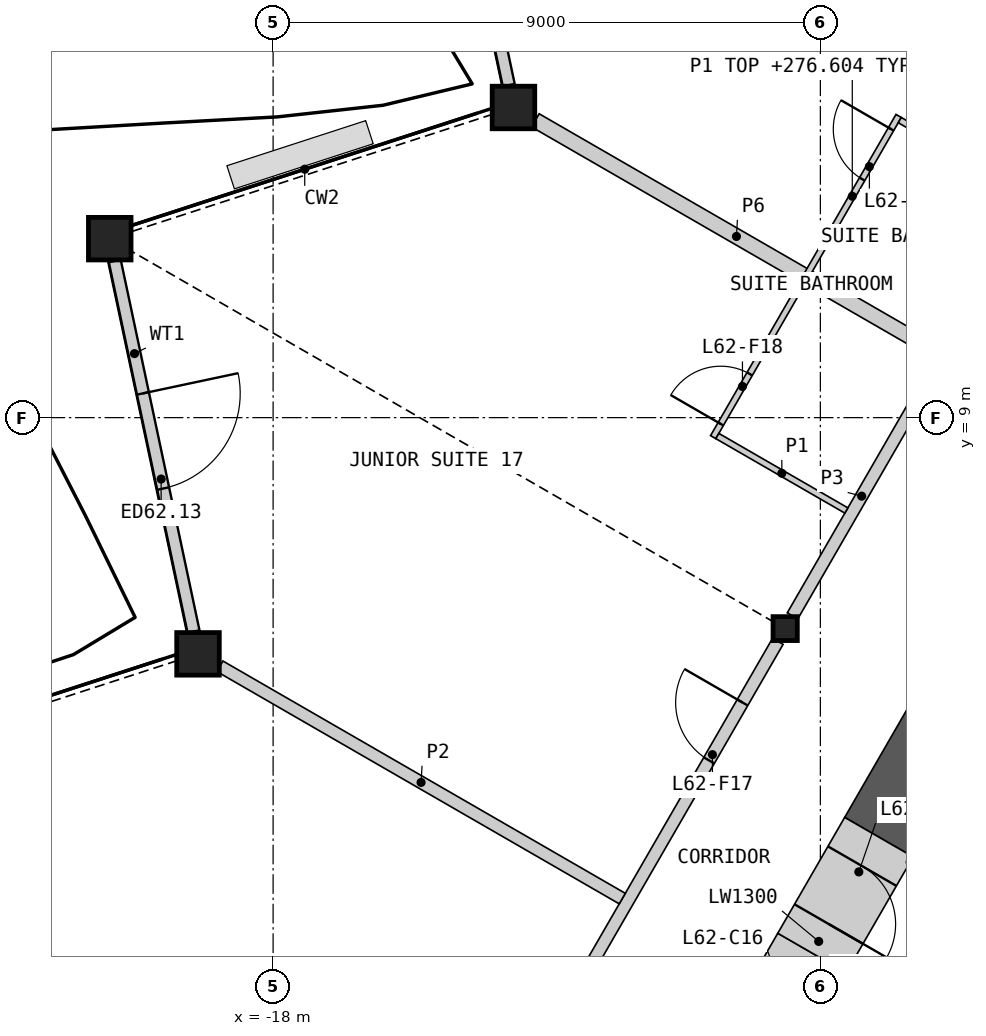
"""IFC4 building model, lengths in metres.
Left out: names, types, materials, properties, quantities, classifications, styles, units other than length and angle.
Written with IfcOpenShell. Run it as: python <this file> out.ifc"""

import sys

from ifc_helpers import new_model, si_unit, direction, frame, frame_2d, origin, origin_2d, place, context, subcontext, project, spatial, rectangle, hollow_rectangle, i_section, extrude, element, fill, save


model = new_model("IFC4")
c1 = context("Model", 3, precision=1e-05, world=origin(), true_north=direction((0.0, 1.0)))
c2 = subcontext(c1, "Body", "Model", "MODEL_VIEW")
j1 = project(units=[si_unit("LENGTHUNIT", "METRE"), si_unit("PLANEANGLEUNIT", "RADIAN")], contexts=[c1])
p1 = place(None, origin())
s1 = spatial("IfcSite", under=j1, at=p1, CompositionType="ELEMENT")
p2 = place(p1, origin())
s2 = spatial("IfcBuilding", under=s1, at=p2, CompositionType="ELEMENT")
p3 = place(p2, frame((0.0, 0.0, 274.2)))
s3 = spatial("IfcBuildingStorey", under=s2, at=p3, CompositionType="ELEMENT", Elevation=274.2)
for number, where, z_axis, x_axis in (
    (1, (-14.047, 14.101, 0.0), (0.0, 0.0, 1.0), (1.0, 0.0, 0.0)),
    (2, (-20.687, 11.943, 0.0), (0.0, 0.0, 1.0), (1.0, 0.0, 0.0)),
    (3, (-19.235, 5.115, 0.0), (0.0, 0.0, 1.0), (1.0, 0.0, 0.0)),
):
    element("IfcColumn", number, at=place(p3, frame(where, z_axis=z_axis, x_axis=x_axis)), inside=s3, PredefinedType="COLUMN", context=c2, shape_type="SweptSolid", body=[
        extrude(hollow_rectangle(XDim=0.7, YDim=0.7, WallThickness=0.045, at=origin_2d()), origin(), (0.0, 0.0, 1.0), 3.6),
    ])
p4 = place(p3, frame((-9.578, 5.53, 0.0), z_axis=(0.0, 0.0, 1.0), x_axis=(1.0, 0.0, 0.0)))
e4 = element("IfcColumn", 4, at=p4, inside=s3, PredefinedType="COLUMN", context=c2, shape_type="SweptSolid", body=[
    extrude(i_section(OverallWidth=0.399, OverallDepth=0.393, WebThickness=0.023, FlangeThickness=0.037, at=origin_2d()), origin(), (0.0, 0.0, 1.0), 3.6),
])
p5 = place(p3, frame((-15.42, 20.563, 0.0), z_axis=(0.0, 0.0, 1.0), x_axis=(0.207907484076, -0.978148494895, 0.0)))
e5 = element("IfcWall", 5, at=p5, inside=s3, PredefinedType="SOLIDWALL", context=c2, shape_type="SweptSolid", body=[
    extrude(rectangle(XDim=6.232, YDim=0.2, at=frame_2d((3.116, 0.0))), origin(), (0.0, 0.0, 1.0), 2.701),
])
p6 = place(p5, frame((2.232, 0.0, 0.0)))
e6 = element("IfcOpeningElement", 6, at=p6, cuts=e5, PredefinedType="OPENING", context=c2, shape_type="SweptSolid", body=[
    extrude(rectangle(XDim=1.6, YDim=2.4, at=frame_2d((0.8, 1.2))), frame((0.0, 0.11, 0.0), z_axis=(0.0, -1.0, 0.0), x_axis=(1.0, 0.0, 0.0)), (0.0, 0.0, 1.0), 0.22),
])
p7 = place(p3, frame((-20.604, 11.577, 0.0), z_axis=(0.0, 0.0, 1.0), x_axis=(0.207907484076, -0.978148494895, 0.0)))
e7 = element("IfcWall", 7, at=p7, inside=s3, PredefinedType="SOLIDWALL", context=c2, shape_type="SweptSolid", body=[
    extrude(rectangle(XDim=6.232, YDim=0.2, at=frame_2d((3.116, 0.0))), origin(), (0.0, 0.0, 1.0), 2.701),
])
p8 = place(p7, frame((2.227, 0.0, 0.0)))
e8 = element("IfcOpeningElement", 8, at=p8, cuts=e7, PredefinedType="OPENING", context=c2, shape_type="SweptSolid", body=[
    extrude(rectangle(XDim=1.6, YDim=2.4, at=frame_2d((0.8, 1.2))), frame((0.0, 0.11, 0.0), z_axis=(0.0, -1.0, 0.0), x_axis=(1.0, 0.0, 0.0)), (0.0, 0.0, 1.0), 0.22),
])
p9 = place(p3, frame((-3.812, 9.418, 0.0), z_axis=(0.0, 0.0, 1.0), x_axis=(-0.499995037753, -0.86602826872, 0.0)))
e9 = element("IfcWall", 9, at=p9, inside=s3, PredefinedType="SHEAR", context=c2, shape_type="SweptSolid", body=[
    extrude(rectangle(XDim=8.451, YDim=1.3, at=frame_2d((4.225, 0.0))), origin(), (0.0, 0.0, 1.0), 3.25),
])
p10 = place(p3, frame((-9.137, 0.195, 0.0), z_axis=(0.0, 0.0, 1.0), x_axis=(-0.500009943768, -0.866019662671, 0.0)))
e10 = element("IfcWall", 10, at=p10, inside=s3, PredefinedType="SHEAR", context=c2, shape_type="SweptSolid", body=[
    extrude(rectangle(XDim=2.401, YDim=1.3, at=frame_2d((1.201, 0.0))), origin(), (0.0, 0.0, 1.0), 3.25),
])
p11 = place(p10, frame((0.8, 0.0, 0.0)))
e11 = element("IfcOpeningElement", 11, at=p11, cuts=e10, PredefinedType="OPENING", context=c2, shape_type="SweptSolid", body=[
    extrude(rectangle(XDim=1.0, YDim=2.1, at=frame_2d((0.5, 1.05))), frame((0.0, 0.66, 0.0), z_axis=(0.0, -1.0, 0.0), x_axis=(1.0, 0.0, 0.0)), (0.0, 0.0, 1.0), 1.32),
])
p12 = place(p3, frame((-8.037, 2.1, 0.0), z_axis=(0.0, 0.0, 1.0), x_axis=(-0.50002983664, -0.866008176907, 0.0)))
e12 = element("IfcWall", 12, at=p12, inside=s3, PredefinedType="SHEAR", context=c2, shape_type="SweptSolid", body=[
    extrude(rectangle(XDim=2.2, YDim=1.3, at=frame_2d((1.1, 0.0))), origin(), (0.0, 0.0, 1.0), 3.25),
])
p13 = place(p12, frame((0.55, 0.0, 0.0)))
e13 = element("IfcOpeningElement", 13, at=p13, cuts=e12, PredefinedType="OPENING", context=c2, shape_type="SweptSolid", body=[
    extrude(rectangle(XDim=1.1, YDim=2.1, at=frame_2d((0.55, 1.05))), frame((0.0, 0.66, 0.0), z_axis=(0.0, -1.0, 0.0), x_axis=(1.0, 0.0, 0.0)), (0.0, 0.0, 1.0), 1.32),
])
p14 = place(p3, frame((-14.247, -2.556, 0.0), z_axis=(0.0, 0.0, 1.0), x_axis=(0.49998193945, 0.866035830797, 0.0)))
e14 = element("IfcWall", 14, at=p14, inside=s3, PredefinedType="PARTITIONING", context=c2, shape_type="SweptSolid", body=[
    extrude(rectangle(XDim=9.094, YDim=0.2, at=frame_2d((4.547, 0.0))), origin(), (0.0, 0.0, 1.0), 3.25),
])
p15 = place(p14, frame((6.833, 0.0, 0.0)))
e15 = element("IfcOpeningElement", 15, at=p15, cuts=e14, PredefinedType="OPENING", context=c2, shape_type="SweptSolid", body=[
    extrude(rectangle(XDim=1.1, YDim=2.1, at=frame_2d((0.55, 1.05))), frame((0.0, 0.11, 0.0), z_axis=(0.0, -1.0, 0.0), x_axis=(1.0, 0.0, 0.0)), (0.0, 0.0, 1.0), 0.22),
])
p16 = place(p3, frame((-9.458, 5.74, 0.0), z_axis=(0.0, 0.0, 1.0), x_axis=(0.50000207303, 0.866024206917, 0.0)))
e16 = element("IfcWall", 16, at=p16, inside=s3, PredefinedType="PARTITIONING", context=c2, shape_type="SweptSolid", body=[
    extrude(rectangle(XDim=9.095, YDim=0.2, at=frame_2d((4.547, 0.0))), origin(), (0.0, 0.0, 1.0), 3.25),
])
p17 = place(p3, frame((-13.687, 13.889, 0.0), z_axis=(0.0, 0.0, 1.0), x_axis=(0.866041332704, -0.499972409287, 0.0)))
e17 = element("IfcWall", 17, at=p17, inside=s3, PredefinedType="PARTITIONING", context=c2, shape_type="SweptSolid", body=[
    extrude(rectangle(XDim=7.638, YDim=0.25, at=frame_2d((3.819, 0.0))), origin(), (0.0, 0.0, 1.0), 2.404),
])
p18 = place(p3, frame((-18.875, 4.91, 0.0), z_axis=(0.0, 0.0, 1.0), x_axis=(0.866018509426, -0.50001194119, 0.0)))
e18 = element("IfcWall", 18, at=p18, inside=s3, PredefinedType="PARTITIONING", context=c2, shape_type="SweptSolid", body=[
    extrude(rectangle(XDim=7.641, YDim=0.2, at=frame_2d((3.82, 0.0))), origin(), (0.0, 0.0, 1.0), 2.404),
])
p19 = place(p3, frame((-10.762, 8.679, 0.0), z_axis=(0.0, 0.0, 1.0), x_axis=(0.500008851346, 0.866020293397, 0.0)))
e19 = element("IfcWall", 19, at=p19, inside=s3, PredefinedType="PARTITIONING", context=c2, shape_type="SweptSolid", body=[
    extrude(rectangle(XDim=6.1, YDim=0.1, at=frame_2d((3.05, 0.0))), origin(), (0.0, 0.0, 1.0), 2.404),
])
p20 = place(p19, frame((4.9, 0.0, 0.0)))
e20 = element("IfcOpeningElement", 20, at=p20, cuts=e19, PredefinedType="OPENING", context=c2, shape_type="SweptSolid", body=[
    extrude(rectangle(XDim=0.95, YDim=2.1, at=frame_2d((0.475, 1.05))), frame((0.0, 0.06, 0.0), z_axis=(0.0, -1.0, 0.0), x_axis=(1.0, 0.0, 0.0)), (0.0, 0.0, 1.0), 0.12),
])
p21 = place(p19, frame((0.25, 0.0, 0.0)))
e21 = element("IfcOpeningElement", 21, at=p21, cuts=e19, PredefinedType="OPENING", context=c2, shape_type="SweptSolid", body=[
    extrude(rectangle(XDim=0.95, YDim=2.1, at=frame_2d((0.475, 1.05))), frame((0.0, 0.06, 0.0), z_axis=(0.0, -1.0, 0.0), x_axis=(1.0, 0.0, 0.0)), (0.0, 0.0, 1.0), 0.12),
])
p22 = place(p3, frame((-10.694, 8.698, 0.0), z_axis=(0.0, 0.0, 1.0), x_axis=(0.866032905446, -0.499987006516, 0.0)))
e22 = element("IfcWall", 22, at=p22, inside=s3, PredefinedType="PARTITIONING", context=c2, shape_type="SweptSolid", body=[
    extrude(rectangle(XDim=2.45, YDim=0.1, at=frame_2d((1.225, 0.0))), origin(), (0.0, 0.0, 1.0), 2.404),
])
p23 = place(p3, frame((-7.694, 13.894, 0.0), z_axis=(0.0, 0.0, 1.0), x_axis=(0.865989751695, -0.500061746146, 0.0)))
e23 = element("IfcWall", 23, at=p23, inside=s3, PredefinedType="PARTITIONING", context=c2, shape_type="SweptSolid", body=[
    extrude(rectangle(XDim=2.45, YDim=0.1, at=frame_2d((1.225, 0.0))), origin(), (0.0, 0.0, 1.0), 2.404),
])
p24 = place(p8, origin())
e24 = element("IfcDoor", 24, at=p24, inside=s3, OperationType="DOUBLE_DOOR_SINGLE_SWING", PredefinedType="DOOR", context=c2, shape_type="SweptSolid", body=[
    extrude(rectangle(XDim=1.6, YDim=2.4, at=frame_2d((0.8, 1.2))), frame((0.0, 0.025, 0.0), z_axis=(0.0, -1.0, 0.0), x_axis=(1.0, 0.0, 0.0)), (0.0, 0.0, 1.0), 0.05),
])
fill(e8, e24)
p25 = place(p13, origin())
e25 = element("IfcDoor", 25, at=p25, inside=s3, OperationType="SINGLE_SWING_RIGHT", PredefinedType="DOOR", context=c2, shape_type="SweptSolid", body=[
    extrude(rectangle(XDim=1.1, YDim=2.1, at=frame_2d((0.55, 1.05))), frame((0.0, 0.405, 0.0), z_axis=(0.0, -1.0, 0.0), x_axis=(1.0, 0.0, 0.0)), (0.0, 0.0, 1.0), 0.05),
])
fill(e13, e25)
p26 = place(p20, origin())
e26 = element("IfcDoor", 26, at=p26, inside=s3, OperationType="SINGLE_SWING_RIGHT", PredefinedType="DOOR", context=c2, shape_type="SweptSolid", body=[
    extrude(rectangle(XDim=0.95, YDim=2.1, at=frame_2d((0.475, 1.05))), frame((0.0, 0.025, 0.0), z_axis=(0.0, -1.0, 0.0), x_axis=(1.0, 0.0, 0.0)), (0.0, 0.0, 1.0), 0.05),
])
fill(e20, e26)
p27 = place(p15, origin())
e27 = element("IfcDoor", 27, at=p27, inside=s3, OperationType="SINGLE_SWING_RIGHT", PredefinedType="DOOR", context=c2, shape_type="SweptSolid", body=[
    extrude(rectangle(XDim=1.1, YDim=2.1, at=frame_2d((0.55, 1.05))), frame((0.0, 0.025, 0.0), z_axis=(0.0, -1.0, 0.0), x_axis=(1.0, 0.0, 0.0)), (0.0, 0.0, 1.0), 0.05),
])
fill(e15, e27)
p28 = place(p21, origin())
e28 = element("IfcDoor", 28, at=p28, inside=s3, OperationType="SINGLE_SWING_LEFT", PredefinedType="DOOR", context=c2, shape_type="SweptSolid", body=[
    extrude(rectangle(XDim=0.95, YDim=2.1, at=frame_2d((0.475, 1.05))), frame((0.0, 0.025, 0.0), z_axis=(0.0, -1.0, 0.0), x_axis=(1.0, 0.0, 0.0)), (0.0, 0.0, 1.0), 0.05),
])
fill(e21, e28)
save(model, sys.argv[1])
